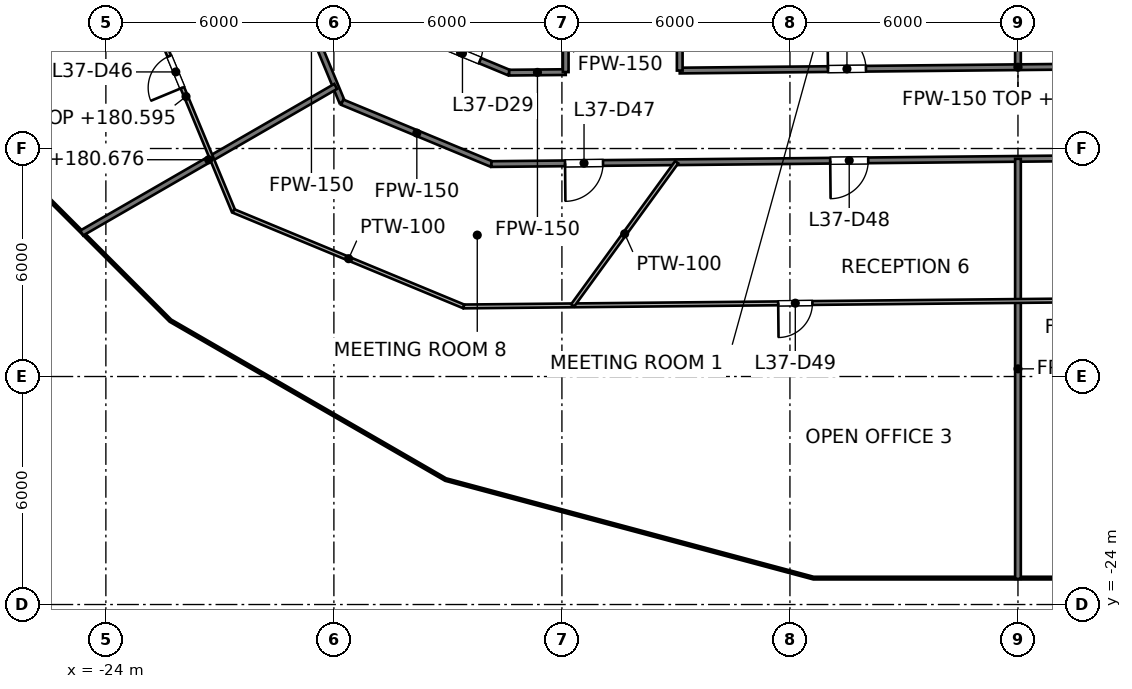
"""IFC4 building model, lengths in metres.
Left out: names, types, materials, properties, quantities, classifications, styles, units other than length and angle.
Written with IfcOpenShell. Run it as: python <this file> out.ifc"""

import sys

from ifc_helpers import new_model, si_unit, direction, frame, frame_2d, origin, place, context, subcontext, project, spatial, rectangle, extrude, element, fill, save


model = new_model("IFC4")
c1 = context("Model", 3, precision=1e-05, world=origin(), true_north=direction((0.0, 1.0)))
c2 = subcontext(c1, "Body", "Model", "MODEL_VIEW")
j1 = project(units=[si_unit("LENGTHUNIT", "METRE"), si_unit("PLANEANGLEUNIT", "RADIAN")], contexts=[c1])
p1 = place(None, origin())
s1 = spatial("IfcSite", under=j1, at=p1, CompositionType="ELEMENT")
p2 = place(p1, origin())
s2 = spatial("IfcBuilding", under=s1, at=p2, CompositionType="ELEMENT")
p3 = place(p2, frame((0.0, 0.0, 177.6)))
s3 = spatial("IfcBuildingStorey", under=s2, at=p3, CompositionType="ELEMENT", Elevation=177.6)
p4 = place(p3, frame((-19.4, -6.876, 0.0), z_axis=(0.0, 0.0, 1.0), x_axis=(0.382843135608, -0.92381336509, 0.0)))
e1 = element("IfcWall", 1, at=p4, inside=s3, PredefinedType="PARTITIONING", context=c2, shape_type="SweptSolid", body=[
    extrude(rectangle(XDim=4.227, YDim=0.15, at=frame_2d((2.114, 0.0))), origin(), (0.0, 0.0, 1.0), 2.995),
])
p5 = place(p4, frame((1.438, 0.0, 0.0)))
e2 = element("IfcOpeningElement", 2, at=p5, cuts=e1, PredefinedType="OPENING", context=c2, shape_type="SweptSolid", body=[
    extrude(rectangle(XDim=1.0, YDim=2.1, at=frame_2d((0.5, 1.05))), frame((0.0, 0.075, 0.0), z_axis=(0.0, -1.0, 0.0), x_axis=(1.0, 0.0, 0.0)), (0.0, 0.0, 1.0), 0.15),
])
p6 = place(p3, frame((-17.781, -10.781, 0.0), z_axis=(0.0, 0.0, 1.0), x_axis=(0.923814466195, -0.382840478592, 0.0)))
e3 = element("IfcWall", 3, at=p6, inside=s3, PredefinedType="PARTITIONING", context=c2, shape_type="SweptSolid", body=[
    extrude(rectangle(XDim=4.25, YDim=0.15, at=frame_2d((2.125, 0.0))), origin(), (0.0, 0.0, 1.0), 2.995),
])
p7 = place(p3, frame((-15.945, -8.945, 0.0), z_axis=(0.0, 0.0, 1.0), x_axis=(0.923818976108, -0.382829595752, 0.0)))
e4 = element("IfcWall", 4, at=p7, inside=s3, PredefinedType="PARTITIONING", context=c2, shape_type="SweptSolid", body=[
    extrude(rectangle(XDim=2.768, YDim=0.15, at=frame_2d((1.384, 0.0))), origin(), (0.0, 0.0, 1.0), 2.995),
])
p8 = place(p7, frame((0.938, 0.0, 0.0)))
e5 = element("IfcOpeningElement", 5, at=p8, cuts=e4, PredefinedType="OPENING", context=c2, shape_type="SweptSolid", body=[
    extrude(rectangle(XDim=1.0, YDim=2.1, at=frame_2d((0.5, 1.05))), frame((0.0, 0.075, 0.0), z_axis=(0.0, -1.0, 0.0), x_axis=(1.0, 0.0, 0.0)), (0.0, 0.0, 1.0), 0.15),
])
p9 = place(p3, frame((-13.855, -12.409, 0.0), z_axis=(0.0, 0.0, 1.0), x_axis=(0.999951009258, 0.009898438446, 0.0)))
e6 = element("IfcWall", 6, at=p9, inside=s3, PredefinedType="PARTITIONING", context=c2, shape_type="SweptSolid", body=[
    extrude(rectangle(XDim=30.411, YDim=0.15, at=frame_2d((15.206, 0.0))), origin(), (0.0, 0.0, 1.0), 2.927),
])
p10 = place(p9, frame((16.877, 0.0, 0.0)))
e7 = element("IfcOpeningElement", 7, at=p10, cuts=e6, PredefinedType="OPENING", context=c2, shape_type="SweptSolid", body=[
    extrude(rectangle(XDim=1.0, YDim=2.1, at=frame_2d((0.5, 1.05))), frame((0.0, 0.075, 0.0), z_axis=(0.0, -1.0, 0.0), x_axis=(1.0, 0.0, 0.0)), (0.0, 0.0, 1.0), 0.15),
])
p11 = place(p9, frame((25.106, 0.0, 0.0)))
e8 = element("IfcOpeningElement", 8, at=p11, cuts=e6, PredefinedType="OPENING", context=c2, shape_type="SweptSolid", body=[
    extrude(rectangle(XDim=1.0, YDim=2.1, at=frame_2d((0.5, 1.05))), frame((0.0, 0.075, 0.0), z_axis=(0.0, -1.0, 0.0), x_axis=(1.0, 0.0, 0.0)), (0.0, 0.0, 1.0), 0.15),
])
p12 = place(p9, frame((1.937, 0.0, 0.0)))
e9 = element("IfcOpeningElement", 9, at=p12, cuts=e6, PredefinedType="OPENING", context=c2, shape_type="SweptSolid", body=[
    extrude(rectangle(XDim=1.0, YDim=2.1, at=frame_2d((0.5, 1.05))), frame((0.0, 0.075, 0.0), z_axis=(0.0, -1.0, 0.0), x_axis=(1.0, 0.0, 0.0)), (0.0, 0.0, 1.0), 0.15),
])
p13 = place(p9, frame((8.915, 0.0, 0.0)))
e10 = element("IfcOpeningElement", 10, at=p13, cuts=e6, PredefinedType="OPENING", context=c2, shape_type="SweptSolid", body=[
    extrude(rectangle(XDim=1.0, YDim=2.1, at=frame_2d((0.5, 1.05))), frame((0.0, 0.075, 0.0), z_axis=(0.0, -1.0, 0.0), x_axis=(1.0, 0.0, 0.0)), (0.0, 0.0, 1.0), 0.15),
])
p14 = place(p3, frame((-13.388, -10.004, 0.0), z_axis=(0.0, 0.0, 1.0), x_axis=(0.999951550029, 0.009843657588, 0.0)))
e11 = element("IfcWall", 11, at=p14, inside=s3, PredefinedType="PARTITIONING", context=c2, shape_type="SweptSolid", body=[
    extrude(rectangle(XDim=1.488, YDim=0.15, at=frame_2d((0.744, 0.0))), origin(), (0.0, 0.0, 1.0), 2.995),
])
p15 = place(p3, frame((-8.9, -9.949, 0.0), z_axis=(0.0, 0.0, 1.0), x_axis=(0.999950969978, 0.009902405776, 0.0)))
e12 = element("IfcWall", 12, at=p15, inside=s3, PredefinedType="PARTITIONING", context=c2, shape_type="SweptSolid", body=[
    extrude(rectangle(XDim=17.801, YDim=0.15, at=frame_2d((8.9, 0.0))), origin(), (0.0, 0.0, 1.0), 2.927),
])
p16 = place(p15, frame((3.9, 0.0, 0.0)))
e13 = element("IfcOpeningElement", 13, at=p16, cuts=e12, PredefinedType="OPENING", context=c2, shape_type="SweptSolid", body=[
    extrude(rectangle(XDim=1.0, YDim=2.1, at=frame_2d((0.5, 1.05))), frame((0.0, 0.075, 0.0), z_axis=(0.0, -1.0, 0.0), x_axis=(1.0, 0.0, 0.0)), (0.0, 0.0, 1.0), 0.15),
])
p17 = place(p15, frame((12.801, 0.0, 0.0)))
e14 = element("IfcOpeningElement", 14, at=p17, cuts=e12, PredefinedType="OPENING", context=c2, shape_type="SweptSolid", body=[
    extrude(rectangle(XDim=1.0, YDim=2.1, at=frame_2d((0.5, 1.05))), frame((0.0, 0.075, 0.0), z_axis=(0.0, -1.0, 0.0), x_axis=(1.0, 0.0, 0.0)), (0.0, 0.0, 1.0), 0.15),
])
p18 = place(p3, frame((-24.636, -14.224, 0.0), z_axis=(0.0, 0.0, 1.0), x_axis=(0.866036485599, 0.499980805243, 0.0)))
e15 = element("IfcWall", 15, at=p18, inside=s3, PredefinedType="PARTITIONING", context=c2, shape_type="SweptSolid", body=[
    extrude(rectangle(XDim=7.717, YDim=0.15, at=frame_2d((3.858, 0.0))), origin(), (0.0, 0.0, 1.0), 3.076),
])
p19 = place(p3, frame((0.0, -23.325, 0.0), z_axis=(0.0, 0.0, 1.0), x_axis=(0.0, 1.0, 0.0)))
e16 = element("IfcWall", 16, at=p19, inside=s3, PredefinedType="PARTITIONING", context=c2, shape_type="SweptSolid", body=[
    extrude(rectangle(XDim=11.054, YDim=0.15, at=frame_2d((5.527, 0.0))), origin(), (0.0, 0.0, 1.0), 2.927),
])
p20 = place(p3, frame((0.0, -9.861, 0.0), z_axis=(0.0, 0.0, 1.0), x_axis=(0.0, 1.0, 0.0)))
e17 = element("IfcWall", 17, at=p20, inside=s3, PredefinedType="PARTITIONING", context=c2, shape_type="SweptSolid", body=[
    extrude(rectangle(XDim=1.861, YDim=0.15, at=frame_2d((0.931, 0.0))), origin(), (0.0, 0.0, 1.0), 2.927),
])
p21 = place(p3, frame((-8.9, -9.949, 0.0), z_axis=(0.0, 0.0, 1.0), x_axis=(0.0, 1.0, 0.0)))
e18 = element("IfcWall", 18, at=p21, inside=s3, PredefinedType="PARTITIONING", context=c2, shape_type="SweptSolid", body=[
    extrude(rectangle(XDim=1.949, YDim=0.15, at=frame_2d((0.975, 0.0))), origin(), (0.0, 0.0, 1.0), 2.927),
])
p22 = place(p3, frame((-11.9, -9.989, 0.0), z_axis=(0.0, 0.0, 1.0), x_axis=(0.0, 1.0, 0.0)))
e19 = element("IfcWall", 19, at=p22, inside=s3, PredefinedType="PARTITIONING", context=c2, shape_type="SweptSolid", body=[
    extrude(rectangle(XDim=1.989, YDim=0.15, at=frame_2d((0.995, 0.0))), origin(), (0.0, 0.0, 1.0), 2.995),
])
p23 = place(p3, frame((-23.14, -7.621, 0.0), z_axis=(0.0, 0.0, 1.0), x_axis=(0.383080493462, -0.923714964439, 0.0)))
e20 = element("IfcWall", 20, at=p23, inside=s3, PredefinedType="PARTITIONING", context=c2, shape_type="SweptSolid", body=[
    extrude(rectangle(XDim=6.519, YDim=0.1, at=frame_2d((3.26, 0.0))), origin(), (0.0, 0.0, 1.0), 2.995),
])
p24 = place(p23, frame((2.109, 0.0, 0.0)))
e21 = element("IfcOpeningElement", 21, at=p24, cuts=e20, PredefinedType="OPENING", context=c2, shape_type="SweptSolid", body=[
    extrude(rectangle(XDim=0.9, YDim=2.1, at=frame_2d((0.45, 1.05))), frame((0.0, 0.05, 0.0), z_axis=(0.0, -1.0, 0.0), x_axis=(1.0, 0.0, 0.0)), (0.0, 0.0, 1.0), 0.1),
])
p25 = place(p3, frame((-20.643, -13.643, 0.0), z_axis=(0.0, 0.0, 1.0), x_axis=(0.923751425001, -0.382992564953, 0.0)))
e22 = element("IfcWall", 22, at=p25, inside=s3, PredefinedType="PARTITIONING", context=c2, shape_type="SweptSolid", body=[
    extrude(rectangle(XDim=6.561, YDim=0.1, at=frame_2d((3.281, 0.0))), origin(), (0.0, 0.0, 1.0), 2.927),
])
p26 = place(p3, frame((-14.582, -16.156, 0.0), z_axis=(0.0, 0.0, 1.0), x_axis=(0.999951338757, 0.009865095958, 0.0)))
e23 = element("IfcWall", 23, at=p26, inside=s3, PredefinedType="PARTITIONING", context=c2, shape_type="SweptSolid", body=[
    extrude(rectangle(XDim=33.311, YDim=0.1, at=frame_2d((16.655, 0.0))), origin(), (0.0, 0.0, 1.0), 2.927),
])
p27 = place(p26, frame((27.692, 0.0, 0.0)))
e24 = element("IfcOpeningElement", 24, at=p27, cuts=e23, PredefinedType="OPENING", context=c2, shape_type="SweptSolid", body=[
    extrude(rectangle(XDim=1.8, YDim=2.1, at=frame_2d((0.9, 1.05))), frame((0.0, 0.05, 0.0), z_axis=(0.0, -1.0, 0.0), x_axis=(1.0, 0.0, 0.0)), (0.0, 0.0, 1.0), 0.1),
])
p28 = place(p26, frame((8.273, 0.0, 0.0)))
e25 = element("IfcOpeningElement", 25, at=p28, cuts=e23, PredefinedType="OPENING", context=c2, shape_type="SweptSolid", body=[
    extrude(rectangle(XDim=0.9, YDim=2.1, at=frame_2d((0.45, 1.05))), frame((0.0, 0.05, 0.0), z_axis=(0.0, -1.0, 0.0), x_axis=(1.0, 0.0, 0.0)), (0.0, 0.0, 1.0), 0.1),
])
p29 = place(p3, frame((-11.717, -16.128, 0.0), z_axis=(0.0, 0.0, 1.0), x_axis=(0.587825586486, 0.808987688332, 0.0)))
e26 = element("IfcWall", 26, at=p29, inside=s3, PredefinedType="PARTITIONING", context=c2, shape_type="SweptSolid", body=[
    extrude(rectangle(XDim=4.656, YDim=0.1, at=frame_2d((2.328, 0.0))), origin(), (0.0, 0.0, 1.0), 2.927),
])
p30 = place(p16, origin())
e27 = element("IfcDoor", 27, at=p30, inside=s3, OperationType="SINGLE_SWING_LEFT", PredefinedType="DOOR", context=c2, shape_type="SweptSolid", body=[
    extrude(rectangle(XDim=1.0, YDim=2.1, at=frame_2d((0.5, 1.05))), frame((0.0, 0.025, 0.0), z_axis=(0.0, -1.0, 0.0), x_axis=(1.0, 0.0, 0.0)), (0.0, 0.0, 1.0), 0.05),
])
fill(e13, e27)
p31 = place(p8, origin())
e28 = element("IfcDoor", 28, at=p31, inside=s3, OperationType="SINGLE_SWING_LEFT", PredefinedType="DOOR", context=c2, shape_type="SweptSolid", body=[
    extrude(rectangle(XDim=1.0, YDim=2.1, at=frame_2d((0.5, 1.05))), frame((0.0, 0.025, 0.0), z_axis=(0.0, -1.0, 0.0), x_axis=(1.0, 0.0, 0.0)), (0.0, 0.0, 1.0), 0.05),
])
fill(e5, e28)
p32 = place(p24, origin())
e29 = element("IfcDoor", 29, at=p32, inside=s3, OperationType="SINGLE_SWING_RIGHT", PredefinedType="DOOR", context=c2, shape_type="SweptSolid", body=[
    extrude(rectangle(XDim=0.9, YDim=2.1, at=frame_2d((0.45, 1.05))), frame((0.0, 0.025, 0.0), z_axis=(0.0, -1.0, 0.0), x_axis=(1.0, 0.0, 0.0)), (0.0, 0.0, 1.0), 0.05),
])
fill(e21, e29)
p33 = place(p12, origin())
e30 = element("IfcDoor", 30, at=p33, inside=s3, OperationType="SINGLE_SWING_LEFT", PredefinedType="DOOR", context=c2, shape_type="SweptSolid", body=[
    extrude(rectangle(XDim=1.0, YDim=2.1, at=frame_2d((0.5, 1.05))), frame((0.0, 0.025, 0.0), z_axis=(0.0, -1.0, 0.0), x_axis=(1.0, 0.0, 0.0)), (0.0, 0.0, 1.0), 0.05),
])
fill(e9, e30)
p34 = place(p13, origin())
e31 = element("IfcDoor", 31, at=p34, inside=s3, OperationType="SINGLE_SWING_LEFT", PredefinedType="DOOR", context=c2, shape_type="SweptSolid", body=[
    extrude(rectangle(XDim=1.0, YDim=2.1, at=frame_2d((0.5, 1.05))), frame((0.0, 0.025, 0.0), z_axis=(0.0, -1.0, 0.0), x_axis=(1.0, 0.0, 0.0)), (0.0, 0.0, 1.0), 0.05),
])
fill(e10, e31)
p35 = place(p28, origin())
e32 = element("IfcDoor", 32, at=p35, inside=s3, OperationType="SINGLE_SWING_LEFT", PredefinedType="DOOR", context=c2, shape_type="SweptSolid", body=[
    extrude(rectangle(XDim=0.9, YDim=2.1, at=frame_2d((0.45, 1.05))), frame((0.0, 0.025, 0.0), z_axis=(0.0, -1.0, 0.0), x_axis=(1.0, 0.0, 0.0)), (0.0, 0.0, 1.0), 0.05),
])
fill(e25, e32)
save(model, sys.argv[1])
